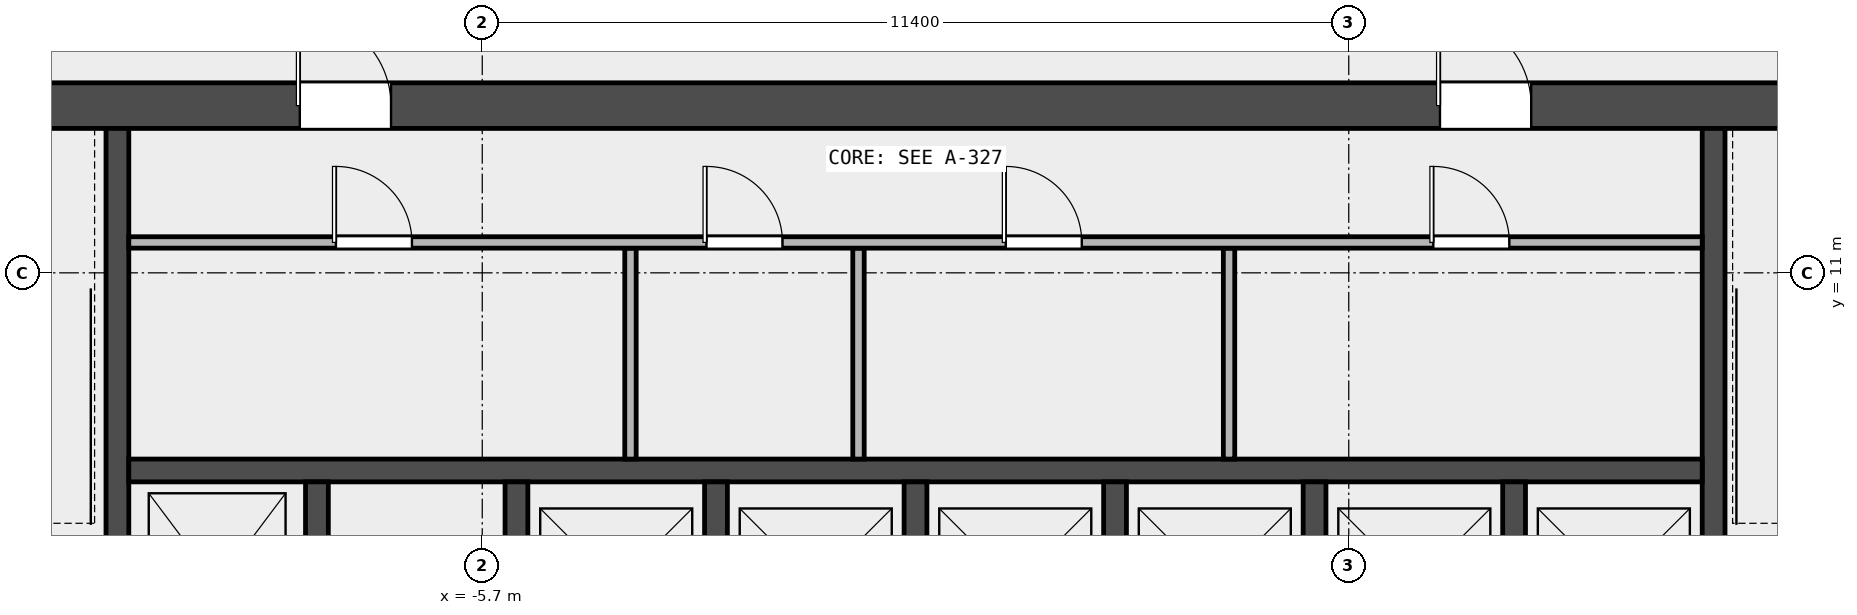
"""IFC4 building model, lengths in metres.
Left out: names, types, materials, properties, quantities, classifications, styles, units other than length and angle.
Written with IfcOpenShell. Run it as: python <this file> out.ifc"""

import sys

from ifc_helpers import new_model, si_unit, direction, frame, frame_2d, origin, place, context, subcontext, project, spatial, rectangle, extrude, element, fill, save


model = new_model("IFC4")
c1 = context("Model", 3, precision=1e-05, world=origin(), true_north=direction((0.0, 1.0)))
c2 = subcontext(c1, "Body", "Model", "MODEL_VIEW")
j1 = project(units=[si_unit("LENGTHUNIT", "METRE"), si_unit("PLANEANGLEUNIT", "RADIAN")], contexts=[c1])
p1 = place(None, origin())
s1 = spatial("IfcSite", under=j1, at=p1, CompositionType="ELEMENT")
p2 = place(p1, origin())
s2 = spatial("IfcBuilding", under=s1, at=p2, CompositionType="ELEMENT")
p3 = place(p2, frame((0.0, 0.0, 287.4)))
s3 = spatial("IfcBuildingStorey", under=s2, at=p3, CompositionType="ELEMENT", Elevation=287.4)
p4 = place(p3, frame((-14.4, 13.2, 0.0), z_axis=(0.0, 0.0, 1.0), x_axis=(1.0, 0.0, 0.0)))
e1 = element("IfcWall", 1, at=p4, inside=s3, PredefinedType="SHEAR", context=c2, shape_type="SweptSolid", body=[
    extrude(rectangle(XDim=28.8, YDim=0.6, at=frame_2d((14.4, 0.0))), origin(), (0.0, 0.0, 1.0), 3.7),
])
p5 = place(p4, frame((6.3, 0.0, 0.0)))
e2 = element("IfcOpeningElement", 2, at=p5, cuts=e1, PredefinedType="OPENING", context=c2, shape_type="SweptSolid", body=[
    extrude(rectangle(XDim=1.2, YDim=2.1, at=frame_2d((0.6, 1.05))), frame((0.0, 0.312, 0.0), z_axis=(0.0, -1.0, 0.0), x_axis=(1.0, 0.0, 0.0)), (0.0, 0.0, 1.0), 0.624),
])
p6 = place(p4, frame((21.3, 0.0, 0.0)))
e3 = element("IfcOpeningElement", 3, at=p6, cuts=e1, PredefinedType="OPENING", context=c2, shape_type="SweptSolid", body=[
    extrude(rectangle(XDim=1.2, YDim=2.1, at=frame_2d((0.6, 1.05))), frame((0.0, 0.312, 0.0), z_axis=(0.0, -1.0, 0.0), x_axis=(1.0, 0.0, 0.0)), (0.0, 0.0, 1.0), 0.624),
])
for number, where, z_axis, x_axis in (
    (4, (-10.5, 5.25, 0.0), (0.0, 0.0, 1.0), (0.0, 1.0, 0.0)),
    (5, (10.5, 5.25, 0.0), (0.0, 0.0, 1.0), (0.0, 1.0, 0.0)),
):
    element("IfcWall", number, at=place(p3, frame(where, z_axis=z_axis, x_axis=x_axis)), inside=s3, PredefinedType="SHEAR", context=c2, shape_type="SweptSolid", body=[
        extrude(rectangle(XDim=7.65, YDim=0.3, at=frame_2d((3.825, 0.0))), origin(), (0.0, 0.0, 1.0), 3.7),
    ])
p7 = place(p3, frame((-10.35, 8.4, 0.0), z_axis=(0.0, 0.0, 1.0), x_axis=(1.0, 0.0, 0.0)))
e6 = element("IfcWall", 6, at=p7, inside=s3, PredefinedType="SOLIDWALL", context=c2, shape_type="SweptSolid", body=[
    extrude(rectangle(XDim=20.7, YDim=0.3, at=frame_2d((10.35, 0.0))), origin(), (0.0, 0.0, 1.0), 3.7),
])
for number, where, z_axis, x_axis in (
    (7, (-7.875, 5.55, 0.0), (0.0, 0.0, 1.0), (0.0, 1.0, 0.0)),
    (8, (-5.25, 5.55, 0.0), (0.0, 0.0, 1.0), (0.0, 1.0, 0.0)),
    (9, (-2.625, 5.55, 0.0), (0.0, 0.0, 1.0), (0.0, 1.0, 0.0)),
    (10, (0.0, 5.55, 0.0), (0.0, 0.0, 1.0), (0.0, 1.0, 0.0)),
    (11, (2.625, 5.55, 0.0), (0.0, 0.0, 1.0), (0.0, 1.0, 0.0)),
    (12, (5.25, 5.55, 0.0), (0.0, 0.0, 1.0), (0.0, 1.0, 0.0)),
    (13, (7.875, 5.55, 0.0), (0.0, 0.0, 1.0), (0.0, 1.0, 0.0)),
):
    element("IfcWall", number, at=place(p3, frame(where, z_axis=z_axis, x_axis=x_axis)), inside=s3, PredefinedType="SOLIDWALL", context=c2, shape_type="SweptSolid", body=[
        extrude(rectangle(XDim=2.7, YDim=0.3, at=frame_2d((1.35, 0.0))), origin(), (0.0, 0.0, 1.0), 3.7),
    ])
for number, where, z_axis, x_axis in (
    (14, (-3.75, 8.55, 0.0), (0.0, 0.0, 1.0), (0.0, 1.0, 0.0)),
    (15, (-0.75, 8.55, 0.0), (0.0, 0.0, 1.0), (0.0, 1.0, 0.0)),
    (16, (4.125, 8.55, 0.0), (0.0, 0.0, 1.0), (0.0, 1.0, 0.0)),
):
    element("IfcWall", number, at=place(p3, frame(where, z_axis=z_axis, x_axis=x_axis)), inside=s3, PredefinedType="PARTITIONING", context=c2, shape_type="SweptSolid", body=[
        extrude(rectangle(XDim=2.775, YDim=0.15, at=frame_2d((1.387, 0.0))), origin(), (0.0, 0.0, 1.0), 3.7),
    ])
p8 = place(p3, frame((-10.35, 11.4, 0.0), z_axis=(0.0, 0.0, 1.0), x_axis=(1.0, 0.0, 0.0)))
e17 = element("IfcWall", 17, at=p8, inside=s3, PredefinedType="PARTITIONING", context=c2, shape_type="SweptSolid", body=[
    extrude(rectangle(XDim=20.7, YDim=0.15, at=frame_2d((10.35, 0.0))), origin(), (0.0, 0.0, 1.0), 3.7),
])
p9 = place(p8, frame((2.725, 0.0, 0.0)))
e18 = element("IfcOpeningElement", 18, at=p9, cuts=e17, PredefinedType="OPENING", context=c2, shape_type="SweptSolid", body=[
    extrude(rectangle(XDim=1.0, YDim=2.1, at=frame_2d((0.5, 1.05))), frame((0.0, 0.087, 0.0), z_axis=(0.0, -1.0, 0.0), x_axis=(1.0, 0.0, 0.0)), (0.0, 0.0, 1.0), 0.174),
])
p10 = place(p8, frame((7.6, 0.0, 0.0)))
e19 = element("IfcOpeningElement", 19, at=p10, cuts=e17, PredefinedType="OPENING", context=c2, shape_type="SweptSolid", body=[
    extrude(rectangle(XDim=1.0, YDim=2.1, at=frame_2d((0.5, 1.05))), frame((0.0, 0.087, 0.0), z_axis=(0.0, -1.0, 0.0), x_axis=(1.0, 0.0, 0.0)), (0.0, 0.0, 1.0), 0.174),
])
p11 = place(p8, frame((11.538, 0.0, 0.0)))
e20 = element("IfcOpeningElement", 20, at=p11, cuts=e17, PredefinedType="OPENING", context=c2, shape_type="SweptSolid", body=[
    extrude(rectangle(XDim=1.0, YDim=2.1, at=frame_2d((0.5, 1.05))), frame((0.0, 0.087, 0.0), z_axis=(0.0, -1.0, 0.0), x_axis=(1.0, 0.0, 0.0)), (0.0, 0.0, 1.0), 0.174),
])
p12 = place(p8, frame((17.163, 0.0, 0.0)))
e21 = element("IfcOpeningElement", 21, at=p12, cuts=e17, PredefinedType="OPENING", context=c2, shape_type="SweptSolid", body=[
    extrude(rectangle(XDim=1.0, YDim=2.1, at=frame_2d((0.5, 1.05))), frame((0.0, 0.087, 0.0), z_axis=(0.0, -1.0, 0.0), x_axis=(1.0, 0.0, 0.0)), (0.0, 0.0, 1.0), 0.174),
])
p13 = place(p9, origin())
e22 = element("IfcDoor", 22, at=p13, inside=s3, OperationType="SINGLE_SWING_LEFT", PredefinedType="DOOR", context=c2, shape_type="SweptSolid", body=[
    extrude(rectangle(XDim=1.0, YDim=2.1, at=frame_2d((0.5, 1.05))), frame((0.0, 0.025, 0.0), z_axis=(0.0, -1.0, 0.0), x_axis=(1.0, 0.0, 0.0)), (0.0, 0.0, 1.0), 0.05),
])
fill(e18, e22)
p14 = place(p10, origin())
e23 = element("IfcDoor", 23, at=p14, inside=s3, OperationType="SINGLE_SWING_LEFT", PredefinedType="DOOR", context=c2, shape_type="SweptSolid", body=[
    extrude(rectangle(XDim=1.0, YDim=2.1, at=frame_2d((0.5, 1.05))), frame((0.0, 0.025, 0.0), z_axis=(0.0, -1.0, 0.0), x_axis=(1.0, 0.0, 0.0)), (0.0, 0.0, 1.0), 0.05),
])
fill(e19, e23)
p15 = place(p11, origin())
e24 = element("IfcDoor", 24, at=p15, inside=s3, OperationType="SINGLE_SWING_LEFT", PredefinedType="DOOR", context=c2, shape_type="SweptSolid", body=[
    extrude(rectangle(XDim=1.0, YDim=2.1, at=frame_2d((0.5, 1.05))), frame((0.0, 0.025, 0.0), z_axis=(0.0, -1.0, 0.0), x_axis=(1.0, 0.0, 0.0)), (0.0, 0.0, 1.0), 0.05),
])
fill(e20, e24)
p16 = place(p12, origin())
e25 = element("IfcDoor", 25, at=p16, inside=s3, OperationType="SINGLE_SWING_LEFT", PredefinedType="DOOR", context=c2, shape_type="SweptSolid", body=[
    extrude(rectangle(XDim=1.0, YDim=2.1, at=frame_2d((0.5, 1.05))), frame((0.0, 0.025, 0.0), z_axis=(0.0, -1.0, 0.0), x_axis=(1.0, 0.0, 0.0)), (0.0, 0.0, 1.0), 0.05),
])
fill(e21, e25)
p17 = place(p5, origin())
e26 = element("IfcDoor", 26, at=p17, inside=s3, OperationType="SINGLE_SWING_LEFT", PredefinedType="DOOR", context=c2, shape_type="SweptSolid", body=[
    extrude(rectangle(XDim=1.2, YDim=2.1, at=frame_2d((0.6, 1.05))), frame((0.0, 0.025, 0.0), z_axis=(0.0, -1.0, 0.0), x_axis=(1.0, 0.0, 0.0)), (0.0, 0.0, 1.0), 0.05),
])
fill(e2, e26)
p18 = place(p6, origin())
e27 = element("IfcDoor", 27, at=p18, inside=s3, OperationType="SINGLE_SWING_RIGHT", PredefinedType="DOOR", context=c2, shape_type="SweptSolid", body=[
    extrude(rectangle(XDim=1.2, YDim=2.1, at=frame_2d((0.6, 1.05))), frame((0.0, 0.025, 0.0), z_axis=(0.0, -1.0, 0.0), x_axis=(1.0, 0.0, 0.0)), (0.0, 0.0, 1.0), 0.05),
])
fill(e3, e27)
save(model, sys.argv[1])
